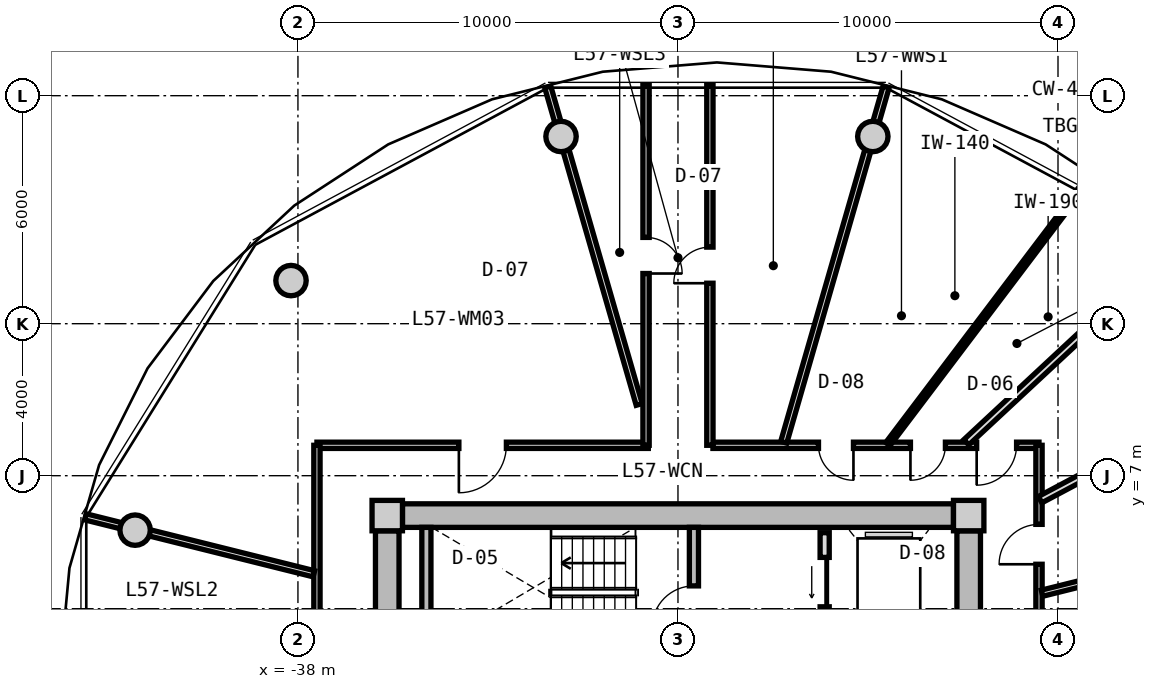
"""IFC4 building model, lengths in metres.
Left out: names, types, materials, properties, quantities, classifications, styles, units other than length and angle.
Written with IfcOpenShell. Run it as: python <this file> out.ifc"""

import sys

from ifc_helpers import new_model, si_unit, direction, frame, frame_2d, origin, origin_2d, place, context, subcontext, project, spatial, rectangle, circle, extrude, source, transform, mapped, element, fill, save


model = new_model("IFC4")
c1 = context("Model", 3, precision=1e-05, world=origin(), true_north=direction((0.0, 1.0)))
c2 = subcontext(c1, "Body", "Model", "MODEL_VIEW")
j1 = project(units=[si_unit("LENGTHUNIT", "METRE"), si_unit("PLANEANGLEUNIT", "RADIAN")], contexts=[c1])
p1 = place(None, origin())
s1 = spatial("IfcSite", under=j1, at=p1, CompositionType="ELEMENT")
p2 = place(p1, origin())
s2 = spatial("IfcBuilding", under=s1, at=p2, CompositionType="ELEMENT")
p3 = place(p2, frame((0.0, 0.0, 183.1)))
s3 = spatial("IfcBuildingStorey", under=s2, at=p3, CompositionType="ELEMENT", Elevation=183.1)
m1 = source(origin(), c2, "Body", "SweptSolid", [
    extrude(rectangle(XDim=0.8, YDim=0.8, at=origin_2d()), origin(), (0.0, 0.0, 1.0), 3.05),
])
for number, where, z_axis, x_axis in (
    (1, (-20.35, 5.95, 0.0), (0.0, 0.0, 1.0), (1.0, 0.0, 0.0)),
    (2, (-35.65, 5.95, 0.0), (0.0, 0.0, 1.0), (1.0, 0.0, 0.0)),
):
    element("IfcColumn", number, at=place(p3, frame(where, z_axis=z_axis, x_axis=x_axis)), inside=s3, PredefinedType="COLUMN", context=c2, shape_type="MappedRepresentation", body=[
        mapped(m1, transform((0.0, 0.0, 0.0), x_axis=(1.0, 0.0, 0.0), y_axis=(0.0, 1.0, 0.0), z_axis=(0.0, 0.0, 1.0), scale=1.0)),
    ])
m2 = source(origin(), c2, "Body", "SweptSolid", [
    extrude(rectangle(XDim=14.5, YDim=0.62, at=frame_2d((7.25, 0.0))), origin(), (0.0, 0.0, 1.0), 2.73),
])
p4 = place(p3, frame((-35.25, 5.95, 0.0), z_axis=(0.0, 0.0, 1.0), x_axis=(1.0, 0.0, 0.0)))
e3 = element("IfcWall", 3, at=p4, inside=s3, PredefinedType="SHEAR", context=c2, shape_type="MappedRepresentation", body=[
    mapped(m2, transform((0.0, 0.0, 0.0), x_axis=(1.0, 0.0, 0.0), y_axis=(0.0, 1.0, 0.0), z_axis=(0.0, 0.0, 1.0), scale=1.0)),
])
m3 = source(origin(), c2, "Body", "SweptSolid", [
    extrude(rectangle(XDim=11.1, YDim=0.62, at=frame_2d((5.55, 0.0))), origin(), (0.0, 0.0, 1.0), 2.73),
])
p5 = place(p3, frame((-35.65, -5.55, 0.0), z_axis=(0.0, 0.0, 1.0), x_axis=(0.0, 1.0, 0.0)))
e4 = element("IfcWall", 4, at=p5, inside=s3, PredefinedType="SHEAR", context=c2, shape_type="MappedRepresentation", body=[
    mapped(m3, transform((0.0, 0.0, 0.0), x_axis=(1.0, 0.0, 0.0), y_axis=(0.0, 1.0, 0.0), z_axis=(0.0, 0.0, 1.0), scale=1.0)),
])
p6 = place(p5, frame((3.8, 0.0, 0.0)))
e5 = element("IfcOpeningElement", 5, at=p6, cuts=e4, PredefinedType="OPENING", context=c2, shape_type="SweptSolid", body=[
    extrude(rectangle(XDim=1.2, YDim=2.15, at=frame_2d((0.6, 1.075))), frame((0.0, 0.32, 0.0), z_axis=(0.0, -1.0, 0.0), x_axis=(1.0, 0.0, 0.0)), (0.0, 0.0, 1.0), 0.64),
])
p7 = place(p3, frame((-20.35, 5.55, 0.0), z_axis=(0.0, 0.0, 1.0), x_axis=(0.0, -1.0, 0.0)))
e6 = element("IfcWall", 6, at=p7, inside=s3, PredefinedType="SHEAR", context=c2, shape_type="MappedRepresentation", body=[
    mapped(m3, transform((0.0, 0.0, 0.0), x_axis=(1.0, 0.0, 0.0), y_axis=(0.0, 1.0, 0.0), z_axis=(0.0, 0.0, 1.0), scale=1.0)),
])
p8 = place(p7, frame((5.65, 0.0, 0.0)))
e7 = element("IfcOpeningElement", 7, at=p8, cuts=e6, PredefinedType="OPENING", context=c2, shape_type="SweptSolid", body=[
    extrude(rectangle(XDim=1.2, YDim=2.15, at=frame_2d((0.6, 1.075))), frame((0.0, 0.32, 0.0), z_axis=(0.0, -1.0, 0.0), x_axis=(1.0, 0.0, 0.0)), (0.0, 0.0, 1.0), 0.64),
])
m4 = source(origin(), c2, "Body", "SweptSolid", [
    extrude(circle(Radius=0.4, at=origin_2d()), origin(), (0.0, 0.0, 1.0), 3.05),
])
for number, where, z_axis, x_axis in (
    (8, (-22.873, 15.926, 0.0), (0.0, 0.0, 1.0), (1.0, 0.0, 0.0)),
    (9, (-31.077, 15.926, 0.0), (0.0, 0.0, 1.0), (1.0, 0.0, 0.0)),
    (10, (-38.183, 12.135, 0.0), (0.0, 0.0, 1.0), (1.0, 0.0, 0.0)),
    (11, (-42.285, 5.567, 0.0), (0.0, 0.0, 1.0), (1.0, 0.0, 0.0)),
):
    element("IfcColumn", number, at=place(p3, frame(where, z_axis=z_axis, x_axis=x_axis)), inside=s3, PredefinedType="COLUMN", context=c2, shape_type="MappedRepresentation", body=[
        mapped(m4, transform((0.0, 0.0, 0.0), x_axis=(1.0, 0.0, 0.0), y_axis=(0.0, 1.0, 0.0), z_axis=(0.0, 0.0, 1.0), scale=1.0)),
    ])
m5 = source(origin(), c2, "Body", "SweptSolid", [
    extrude(rectangle(XDim=3.19, YDim=0.24, at=frame_2d((1.595, 0.0))), origin(), (0.0, 0.0, 1.0), 2.73),
])
p9 = place(p3, frame((-34.62, 2.45, 0.0), z_axis=(0.0, 0.0, 1.0), x_axis=(0.0, 1.0, 0.0)))
e12 = element("IfcWall", 12, at=p9, inside=s3, PredefinedType="PARTITIONING", context=c2, shape_type="MappedRepresentation", body=[
    mapped(m5, transform((0.0, 0.0, 0.0), x_axis=(1.0, 0.0, 0.0), y_axis=(0.0, 1.0, 0.0), z_axis=(0.0, 0.0, 1.0), scale=1.0)),
])
p10 = place(p3, frame((-27.58, 2.45, 0.0), z_axis=(0.0, 0.0, 1.0), x_axis=(0.0, 1.0, 0.0)))
e13 = element("IfcWall", 13, at=p10, inside=s3, PredefinedType="PARTITIONING", context=c2, shape_type="MappedRepresentation", body=[
    mapped(m5, transform((0.0, 0.0, 0.0), x_axis=(1.0, 0.0, 0.0), y_axis=(0.0, 1.0, 0.0), z_axis=(0.0, 0.0, 1.0), scale=1.0)),
])
p11 = place(p10, frame((0.55, 0.0, 0.0)))
e14 = element("IfcOpeningElement", 14, at=p11, cuts=e13, PredefinedType="OPENING", context=c2, shape_type="SweptSolid", body=[
    extrude(rectangle(XDim=1.1, YDim=2.15, at=frame_2d((0.55, 1.075))), frame((0.0, 0.13, 0.0), z_axis=(0.0, -1.0, 0.0), x_axis=(1.0, 0.0, 0.0)), (0.0, 0.0, 1.0), 0.26),
])
m6 = source(origin(), c2, "Body", "SweptSolid", [
    extrude(rectangle(XDim=5.0, YDim=0.24, at=frame_2d((2.5, 0.0))), origin(), (0.0, 0.0, 1.0), 2.715),
])
p12 = place(p3, frame((-24.14, 0.5, 0.0), z_axis=(0.0, 0.0, 1.0), x_axis=(0.0, 1.0, 0.0)))
e15 = element("IfcWall", 15, at=p12, inside=s3, PredefinedType="PARTITIONING", context=c2, shape_type="MappedRepresentation", body=[
    mapped(m6, transform((0.0, 0.0, 0.0), x_axis=(1.0, 0.0, 0.0), y_axis=(0.0, 1.0, 0.0), z_axis=(0.0, 0.0, 1.0), scale=1.0)),
])
p13 = place(p12, frame((3.05, 0.0, 0.0)))
e16 = element("IfcOpeningElement", 16, at=p13, cuts=e15, PredefinedType="OPENING", context=c2, shape_type="SweptSolid", body=[
    extrude(rectangle(XDim=1.3, YDim=2.2, at=frame_2d((0.65, 1.1))), frame((0.0, 0.13, 0.0), z_axis=(0.0, -1.0, 0.0), x_axis=(1.0, 0.0, 0.0)), (0.0, 0.0, 1.0), 0.26),
])
p14 = place(p12, frame((0.55, 0.0, 0.0)))
e17 = element("IfcOpeningElement", 17, at=p14, cuts=e15, PredefinedType="OPENING", context=c2, shape_type="SweptSolid", body=[
    extrude(rectangle(XDim=1.3, YDim=2.2, at=frame_2d((0.65, 1.1))), frame((0.0, 0.13, 0.0), z_axis=(0.0, -1.0, 0.0), x_axis=(1.0, 0.0, 0.0)), (0.0, 0.0, 1.0), 0.26),
])
m7 = source(origin(), c2, "Body", "SweptSolid", [
    extrude(rectangle(XDim=8.719, YDim=0.165, at=frame_2d((4.36, 0.0))), origin(), (0.0, 0.0, 1.0), 2.715),
])
p15 = place(p3, frame((-37.5, 7.8, 0.0), z_axis=(0.0, 0.0, 1.0), x_axis=(1.0, 0.0, 0.0)))
e18 = element("IfcWall", 18, at=p15, inside=s3, PredefinedType="PARTITIONING", context=c2, shape_type="MappedRepresentation", body=[
    mapped(m7, transform((0.0, 0.0, 0.0), x_axis=(1.0, 0.0, 0.0), y_axis=(0.0, 1.0, 0.0), z_axis=(0.0, 0.0, 1.0), scale=1.0)),
])
p16 = place(p15, frame((3.735, 0.0, 0.0)))
e19 = element("IfcOpeningElement", 19, at=p16, cuts=e18, PredefinedType="OPENING", context=c2, shape_type="SweptSolid", body=[
    extrude(rectangle(XDim=1.25, YDim=2.2, at=frame_2d((0.625, 1.1))), frame((0.0, 0.093, 0.0), z_axis=(0.0, -1.0, 0.0), x_axis=(1.0, 0.0, 0.0)), (0.0, 0.0, 1.0), 0.185),
])
m8 = source(origin(), c2, "Body", "SweptSolid", [
    extrude(rectangle(XDim=8.58, YDim=0.165, at=frame_2d((4.29, 0.0))), origin(), (0.0, 0.0, 1.0), 2.715),
])
p17 = place(p3, frame((-27.08, 7.8, 0.0), z_axis=(0.0, 0.0, 1.0), x_axis=(1.0, 0.0, 0.0)))
e20 = element("IfcWall", 20, at=p17, inside=s3, PredefinedType="PARTITIONING", context=c2, shape_type="MappedRepresentation", body=[
    mapped(m8, transform((0.0, 0.0, 0.0), x_axis=(1.0, 0.0, 0.0), y_axis=(0.0, 1.0, 0.0), z_axis=(0.0, 0.0, 1.0), scale=1.0)),
])
p18 = place(p17, frame((6.94, 0.0, 0.0)))
e21 = element("IfcOpeningElement", 21, at=p18, cuts=e20, PredefinedType="OPENING", context=c2, shape_type="SweptSolid", body=[
    extrude(rectangle(XDim=1.05, YDim=2.15, at=frame_2d((0.525, 1.075))), frame((0.0, 0.093, 0.0), z_axis=(0.0, -1.0, 0.0), x_axis=(1.0, 0.0, 0.0)), (0.0, 0.0, 1.0), 0.185),
])
p19 = place(p17, frame((5.197, 0.0, 0.0)))
e22 = element("IfcOpeningElement", 22, at=p19, cuts=e20, PredefinedType="OPENING", context=c2, shape_type="SweptSolid", body=[
    extrude(rectangle(XDim=0.92, YDim=2.1, at=frame_2d((0.46, 1.05))), frame((0.0, 0.093, 0.0), z_axis=(0.0, -1.0, 0.0), x_axis=(1.0, 0.0, 0.0)), (0.0, 0.0, 1.0), 0.185),
])
p20 = place(p17, frame((2.778, 0.0, 0.0)))
e23 = element("IfcOpeningElement", 23, at=p20, cuts=e20, PredefinedType="OPENING", context=c2, shape_type="SweptSolid", body=[
    extrude(rectangle(XDim=0.92, YDim=2.1, at=frame_2d((0.46, 1.05))), frame((0.0, 0.093, 0.0), z_axis=(0.0, -1.0, 0.0), x_axis=(1.0, 0.0, 0.0)), (0.0, 0.0, 1.0), 0.185),
])
m9 = source(origin(), c2, "Body", "SweptSolid", [
    extrude(rectangle(XDim=6.88, YDim=0.165, at=frame_2d((3.44, 0.0))), origin(), (0.0, 0.0, 1.0), 2.715),
])
p21 = place(p3, frame((-37.5, 0.92, 0.0), z_axis=(0.0, 0.0, 1.0), x_axis=(0.0, 1.0, 0.0)))
e24 = element("IfcWall", 24, at=p21, inside=s3, PredefinedType="PARTITIONING", context=c2, shape_type="MappedRepresentation", body=[
    mapped(m9, transform((0.0, 0.0, 0.0), x_axis=(1.0, 0.0, 0.0), y_axis=(0.0, 1.0, 0.0), z_axis=(0.0, 0.0, 1.0), scale=1.0)),
])
p22 = place(p3, frame((-18.5, 7.8, 0.0), z_axis=(0.0, 0.0, 1.0), x_axis=(0.0, -1.0, 0.0)))
e25 = element("IfcWall", 25, at=p22, inside=s3, PredefinedType="PARTITIONING", context=c2, shape_type="MappedRepresentation", body=[
    mapped(m9, transform((0.0, 0.0, 0.0), x_axis=(1.0, 0.0, 0.0), y_axis=(0.0, 1.0, 0.0), z_axis=(0.0, 0.0, 1.0), scale=1.0)),
])
p23 = place(p22, frame((2.081, 0.0, 0.0)))
e26 = element("IfcOpeningElement", 26, at=p23, cuts=e25, PredefinedType="OPENING", context=c2, shape_type="SweptSolid", body=[
    extrude(rectangle(XDim=1.05, YDim=2.15, at=frame_2d((0.525, 1.075))), frame((0.0, 0.093, 0.0), z_axis=(0.0, -1.0, 0.0), x_axis=(1.0, 0.0, 0.0)), (0.0, 0.0, 1.0), 0.185),
])
m10 = source(origin(), c2, "Body", "SweptSolid", [
    extrude(rectangle(XDim=9.73, YDim=0.165, at=frame_2d((4.865, 0.0))), origin(), (0.0, 0.0, 1.0), 2.265),
])
p24 = place(p3, frame((-25.217, 7.88, 0.0), z_axis=(0.0, 0.0, 1.0), x_axis=(0.27679492614, 0.960929013436, 0.0)))
e27 = element("IfcWall", 27, at=p24, inside=s3, PredefinedType="PARTITIONING", context=c2, shape_type="MappedRepresentation", body=[
    mapped(m10, transform((0.0, 0.0, 0.0), x_axis=(1.0, 0.0, 0.0), y_axis=(0.0, 1.0, 0.0), z_axis=(0.0, 0.0, 1.0), scale=1.0)),
])
m11 = source(origin(), c2, "Body", "SweptSolid", [
    extrude(rectangle(XDim=8.695, YDim=0.165, at=frame_2d((4.348, 0.0))), origin(), (0.0, 0.0, 1.0), 2.265),
])
p25 = place(p3, frame((-29.02, 8.875, 0.0), z_axis=(0.0, 0.0, 1.0), x_axis=(-0.276797231892, 0.960928349263, 0.0)))
e28 = element("IfcWall", 28, at=p25, inside=s3, PredefinedType="PARTITIONING", context=c2, shape_type="MappedRepresentation", body=[
    mapped(m11, transform((0.0, 0.0, 0.0), x_axis=(1.0, 0.0, 0.0), y_axis=(0.0, 1.0, 0.0), z_axis=(0.0, 0.0, 1.0), scale=1.0)),
])
m12 = source(origin(), c2, "Body", "SweptSolid", [
    extrude(rectangle(XDim=6.193, YDim=0.165, at=frame_2d((3.096, 0.0))), origin(), (0.0, 0.0, 1.0), 2.265),
])
p26 = place(p3, frame((-37.58, 4.419, 0.0), z_axis=(0.0, 0.0, 1.0), x_axis=(-0.970309243466, 0.241867674657, 0.0)))
e29 = element("IfcWall", 29, at=p26, inside=s3, PredefinedType="PARTITIONING", context=c2, shape_type="MappedRepresentation", body=[
    mapped(m12, transform((0.0, 0.0, 0.0), x_axis=(1.0, 0.0, 0.0), y_axis=(0.0, 1.0, 0.0), z_axis=(0.0, 0.0, 1.0), scale=1.0)),
])
m13 = source(origin(), c2, "Body", "SweptSolid", [
    extrude(rectangle(XDim=8.305, YDim=0.165, at=frame_2d((4.153, 0.0))), origin(), (0.0, 0.0, 1.0), 2.265),
])
p27 = place(p3, frame((-18.42, 3.908, 0.0), z_axis=(0.0, 0.0, 1.0), x_axis=(0.970309994378, 0.241864662175, 0.0)))
e30 = element("IfcWall", 30, at=p27, inside=s3, PredefinedType="PARTITIONING", context=c2, shape_type="MappedRepresentation", body=[
    mapped(m13, transform((0.0, 0.0, 0.0), x_axis=(1.0, 0.0, 0.0), y_axis=(0.0, 1.0, 0.0), z_axis=(0.0, 0.0, 1.0), scale=1.0)),
])
m14 = source(origin(), c2, "Body", "SweptSolid", [
    extrude(rectangle(XDim=9.48, YDim=0.165, at=frame_2d((4.74, 0.0))), origin(), (0.0, 0.0, 1.0), 2.715),
])
p28 = place(p3, frame((-28.84, 7.8, 0.0), z_axis=(0.0, 0.0, 1.0), x_axis=(0.0, 1.0, 0.0)))
e31 = element("IfcWall", 31, at=p28, inside=s3, PredefinedType="PARTITIONING", context=c2, shape_type="MappedRepresentation", body=[
    mapped(m14, transform((0.0, 0.0, 0.0), x_axis=(1.0, 0.0, 0.0), y_axis=(0.0, 1.0, 0.0), z_axis=(0.0, 0.0, 1.0), scale=1.0)),
])
p29 = place(p28, frame((4.521, 0.0, 0.0)))
e32 = element("IfcOpeningElement", 32, at=p29, cuts=e31, PredefinedType="OPENING", context=c2, shape_type="SweptSolid", body=[
    extrude(rectangle(XDim=0.95, YDim=2.1, at=frame_2d((0.475, 1.05))), frame((0.0, 0.093, 0.0), z_axis=(0.0, -1.0, 0.0), x_axis=(1.0, 0.0, 0.0)), (0.0, 0.0, 1.0), 0.185),
])
p30 = place(p3, frame((-27.16, 17.28, 0.0), z_axis=(0.0, 0.0, 1.0), x_axis=(0.0, -1.0, 0.0)))
e33 = element("IfcWall", 33, at=p30, inside=s3, PredefinedType="PARTITIONING", context=c2, shape_type="MappedRepresentation", body=[
    mapped(m14, transform((0.0, 0.0, 0.0), x_axis=(1.0, 0.0, 0.0), y_axis=(0.0, 1.0, 0.0), z_axis=(0.0, 0.0, 1.0), scale=1.0)),
])
p31 = place(p30, frame((4.265, 0.0, 0.0)))
e34 = element("IfcOpeningElement", 34, at=p31, cuts=e33, PredefinedType="OPENING", context=c2, shape_type="SweptSolid", body=[
    extrude(rectangle(XDim=0.95, YDim=2.1, at=frame_2d((0.475, 1.05))), frame((0.0, 0.093, 0.0), z_axis=(0.0, -1.0, 0.0), x_axis=(1.0, 0.0, 0.0)), (0.0, 0.0, 1.0), 0.185),
])
m15 = source(origin(), c2, "Body", "SweptSolid", [
    extrude(rectangle(XDim=7.648, YDim=0.19, at=frame_2d((3.824, 0.0))), origin(), (0.0, 0.0, 1.0), 2.265),
])
p32 = place(p3, frame((-20.413, 7.88, 0.0), z_axis=(0.0, 0.0, 1.0), x_axis=(0.732182665826, 0.681108320213, 0.0)))
e35 = element("IfcWall", 35, at=p32, inside=s3, PredefinedType="PARTITIONING", context=c2, shape_type="MappedRepresentation", body=[
    mapped(m15, transform((0.0, 0.0, 0.0), x_axis=(1.0, 0.0, 0.0), y_axis=(0.0, 1.0, 0.0), z_axis=(0.0, 0.0, 1.0), scale=1.0)),
])
m16 = source(origin(), c2, "Body", "SweptSolid", [
    extrude(rectangle(XDim=6.665, YDim=0.19, at=frame_2d((3.333, 0.0))), origin(), (0.0, 0.0, 1.0), 2.715),
])
p33 = place(p3, frame((-18.47, 6.37, 0.0), z_axis=(0.0, 0.0, 1.0), x_axis=(0.88263769619, 0.470053930166, 0.0)))
e36 = element("IfcWall", 36, at=p33, inside=s3, PredefinedType="PARTITIONING", context=c2, shape_type="MappedRepresentation", body=[
    mapped(m16, transform((0.0, 0.0, 0.0), x_axis=(1.0, 0.0, 0.0), y_axis=(0.0, 1.0, 0.0), z_axis=(0.0, 0.0, 1.0), scale=1.0)),
])
m17 = source(origin(), c2, "Body", "SweptSolid", [
    extrude(rectangle(XDim=8.359, YDim=0.14, at=frame_2d((4.18, 0.0))), origin(), (0.0, 0.0, 1.0), 2.715),
])
p34 = place(p3, frame((-22.477, 7.83, 0.0), z_axis=(0.0, 0.0, 1.0), x_axis=(0.603265985309, 0.797540062297, 0.0)))
e37 = element("IfcWall", 37, at=p34, inside=s3, PredefinedType="PARTITIONING", context=c2, shape_type="MappedRepresentation", body=[
    mapped(m17, transform((0.0, 0.0, 0.0), x_axis=(1.0, 0.0, 0.0), y_axis=(0.0, 1.0, 0.0), z_axis=(0.0, 0.0, 1.0), scale=1.0)),
])
m18 = source(origin(), c2, "Body", "SweptSolid", [
    extrude(rectangle(XDim=1.1, YDim=2.15, at=frame_2d((0.55, 1.075))), frame((0.0, 0.025, 0.0), z_axis=(0.0, -1.0, 0.0), x_axis=(1.0, 0.0, 0.0)), (0.0, 0.0, 1.0), 0.05),
])
p35 = place(p11, origin())
e38 = element("IfcDoor", 38, at=p35, inside=s3, OperationType="SINGLE_SWING_LEFT", PredefinedType="DOOR", context=c2, shape_type="MappedRepresentation", body=[
    mapped(m18, transform((0.0, 0.0, 0.0), x_axis=(1.0, 0.0, 0.0), y_axis=(0.0, 1.0, 0.0), z_axis=(0.0, 0.0, 1.0), scale=1.0)),
])
fill(e14, e38)
m19 = source(origin(), c2, "Body", "SweptSolid", [
    extrude(rectangle(XDim=1.3, YDim=2.2, at=frame_2d((0.65, 1.1))), frame((0.0, 0.025, 0.0), z_axis=(0.0, -1.0, 0.0), x_axis=(1.0, 0.0, 0.0)), (0.0, 0.0, 1.0), 0.05),
])
p36 = place(p13, origin())
e39 = element("IfcDoor", 39, at=p36, inside=s3, OperationType="SLIDING_TO_LEFT", PredefinedType="DOOR", context=c2, shape_type="MappedRepresentation", body=[
    mapped(m19, transform((0.0, 0.0, 0.0), x_axis=(1.0, 0.0, 0.0), y_axis=(0.0, 1.0, 0.0), z_axis=(0.0, 0.0, 1.0), scale=1.0)),
])
fill(e16, e39)
m20 = source(origin(), c2, "Body", "SweptSolid", [
    extrude(rectangle(XDim=0.95, YDim=2.1, at=frame_2d((0.475, 1.05))), frame((0.0, 0.025, 0.0), z_axis=(0.0, -1.0, 0.0), x_axis=(1.0, 0.0, 0.0)), (0.0, 0.0, 1.0), 0.05),
])
p37 = place(p29, frame((0.95, 0.0, 0.0), z_axis=(0.0, 0.0, 1.0), x_axis=(-1.0, 0.0, 0.0)))
e40 = element("IfcDoor", 40, at=p37, inside=s3, OperationType="SINGLE_SWING_RIGHT", PredefinedType="DOOR", context=c2, shape_type="MappedRepresentation", body=[
    mapped(m20, transform((0.0, 0.0, 0.0), x_axis=(1.0, 0.0, 0.0), y_axis=(0.0, 1.0, 0.0), z_axis=(0.0, 0.0, 1.0), scale=1.0)),
])
fill(e32, e40)
p38 = place(p31, frame((0.95, 0.0, 0.0), z_axis=(0.0, 0.0, 1.0), x_axis=(-1.0, 0.0, 0.0)))
e41 = element("IfcDoor", 41, at=p38, inside=s3, OperationType="SINGLE_SWING_LEFT", PredefinedType="DOOR", context=c2, shape_type="MappedRepresentation", body=[
    mapped(m20, transform((0.0, 0.0, 0.0), x_axis=(1.0, 0.0, 0.0), y_axis=(0.0, 1.0, 0.0), z_axis=(0.0, 0.0, 1.0), scale=1.0)),
])
fill(e34, e41)
m21 = source(origin(), c2, "Body", "SweptSolid", [
    extrude(rectangle(XDim=1.05, YDim=2.15, at=frame_2d((0.525, 1.075))), frame((0.0, 0.025, 0.0), z_axis=(0.0, -1.0, 0.0), x_axis=(1.0, 0.0, 0.0)), (0.0, 0.0, 1.0), 0.05),
])
p39 = place(p23, frame((1.05, 0.0, 0.0), z_axis=(0.0, 0.0, 1.0), x_axis=(-1.0, 0.0, 0.0)))
e42 = element("IfcDoor", 42, at=p39, inside=s3, OperationType="SINGLE_SWING_LEFT", PredefinedType="DOOR", context=c2, shape_type="MappedRepresentation", body=[
    mapped(m21, transform((0.0, 0.0, 0.0), x_axis=(1.0, 0.0, 0.0), y_axis=(0.0, 1.0, 0.0), z_axis=(0.0, 0.0, 1.0), scale=1.0)),
])
fill(e26, e42)
p40 = place(p18, frame((1.05, 0.0, 0.0), z_axis=(0.0, 0.0, 1.0), x_axis=(-1.0, 0.0, 0.0)))
e43 = element("IfcDoor", 43, at=p40, inside=s3, OperationType="SINGLE_SWING_RIGHT", PredefinedType="DOOR", context=c2, shape_type="MappedRepresentation", body=[
    mapped(m21, transform((0.0, 0.0, 0.0), x_axis=(1.0, 0.0, 0.0), y_axis=(0.0, 1.0, 0.0), z_axis=(0.0, 0.0, 1.0), scale=1.0)),
])
fill(e21, e43)
m22 = source(origin(), c2, "Body", "SweptSolid", [
    extrude(rectangle(XDim=0.92, YDim=2.1, at=frame_2d((0.46, 1.05))), frame((0.0, 0.025, 0.0), z_axis=(0.0, -1.0, 0.0), x_axis=(1.0, 0.0, 0.0)), (0.0, 0.0, 1.0), 0.05),
])
p41 = place(p19, frame((0.92, 0.0, 0.0), z_axis=(0.0, 0.0, 1.0), x_axis=(-1.0, 0.0, 0.0)))
e44 = element("IfcDoor", 44, at=p41, inside=s3, OperationType="SINGLE_SWING_RIGHT", PredefinedType="DOOR", context=c2, shape_type="MappedRepresentation", body=[
    mapped(m22, transform((0.0, 0.0, 0.0), x_axis=(1.0, 0.0, 0.0), y_axis=(0.0, 1.0, 0.0), z_axis=(0.0, 0.0, 1.0), scale=1.0)),
])
fill(e22, e44)
p42 = place(p20, frame((0.92, 0.0, 0.0), z_axis=(0.0, 0.0, 1.0), x_axis=(-1.0, 0.0, 0.0)))
e45 = element("IfcDoor", 45, at=p42, inside=s3, OperationType="SINGLE_SWING_LEFT", PredefinedType="DOOR", context=c2, shape_type="MappedRepresentation", body=[
    mapped(m22, transform((0.0, 0.0, 0.0), x_axis=(1.0, 0.0, 0.0), y_axis=(0.0, 1.0, 0.0), z_axis=(0.0, 0.0, 1.0), scale=1.0)),
])
fill(e23, e45)
m23 = source(origin(), c2, "Body", "SweptSolid", [
    extrude(rectangle(XDim=1.25, YDim=2.2, at=frame_2d((0.625, 1.1))), frame((0.0, 0.025, 0.0), z_axis=(0.0, -1.0, 0.0), x_axis=(1.0, 0.0, 0.0)), (0.0, 0.0, 1.0), 0.05),
])
p43 = place(p16, frame((1.25, 0.0, 0.0), z_axis=(0.0, 0.0, 1.0), x_axis=(-1.0, 0.0, 0.0)))
e46 = element("IfcDoor", 46, at=p43, inside=s3, OperationType="SINGLE_SWING_RIGHT", PredefinedType="DOOR", context=c2, shape_type="MappedRepresentation", body=[
    mapped(m23, transform((0.0, 0.0, 0.0), x_axis=(1.0, 0.0, 0.0), y_axis=(0.0, 1.0, 0.0), z_axis=(0.0, 0.0, 1.0), scale=1.0)),
])
fill(e19, e46)
save(model, sys.argv[1])
